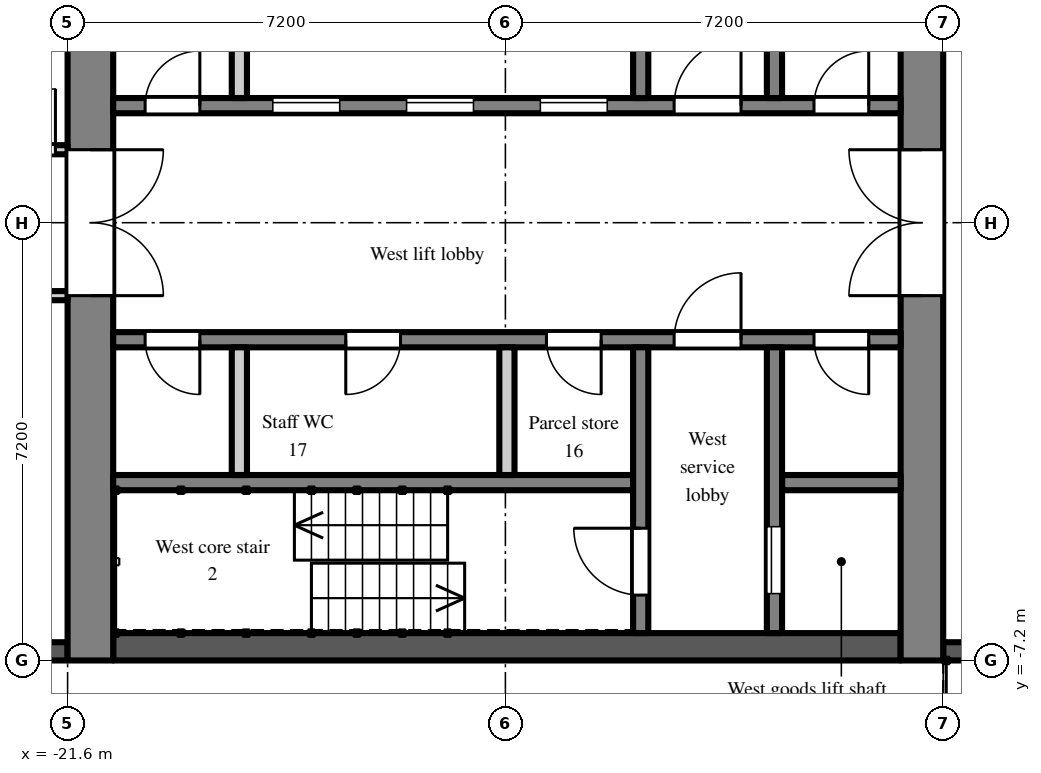
"""IFC4 building model, lengths in metres.
Left out: names, types, materials, properties, quantities, classifications, styles, units other than length and angle.
Written with IfcOpenShell. Run it as: python <this file> out.ifc"""

import sys

from ifc_helpers import new_model, si_unit, direction, frame, frame_2d, origin, place, context, subcontext, project, spatial, rectangle, extrude, element, fill, save


model = new_model("IFC4")
c1 = context("Model", 3, precision=1e-05, world=origin(), true_north=direction((0.0, 1.0)))
c2 = subcontext(c1, "Body", "Model", "MODEL_VIEW")
j1 = project(units=[si_unit("LENGTHUNIT", "METRE"), si_unit("PLANEANGLEUNIT", "RADIAN")], contexts=[c1])
p1 = place(None, origin())
s1 = spatial("IfcSite", under=j1, at=p1, CompositionType="ELEMENT")
p2 = place(p1, origin())
s2 = spatial("IfcBuilding", under=s1, at=p2, CompositionType="ELEMENT")
p3 = place(p2, frame((0.0, 0.0, 123.3)))
s3 = spatial("IfcBuildingStorey", under=s2, at=p3, CompositionType="ELEMENT", Elevation=123.3)
p4 = place(p3, frame((-24.3, -7.05, 0.0), z_axis=(0.0, 0.0, 1.0), x_axis=(1.0, 0.0, 0.0)))
e1 = element("IfcWall", 1, at=p4, inside=s3, PredefinedType="SOLIDWALL", context=c2, shape_type="SweptSolid", body=[
    extrude(rectangle(XDim=2.7, YDim=0.3, at=frame_2d((1.35, 0.0))), origin(), (0.0, 0.0, 1.0), 2.2),
])
p5 = place(p4, frame((0.75, 0.0, 0.2)))
e2 = element("IfcOpeningElement", 2, at=p5, cuts=e1, PredefinedType="OPENING", context=c2, shape_type="SweptSolid", body=[
    extrude(rectangle(XDim=1.2, YDim=1.85, at=frame_2d((0.6, 0.925))), frame((0.0, 0.16, 0.0), z_axis=(0.0, -1.0, 0.0), x_axis=(1.0, 0.0, 0.0)), (0.0, 0.0, 1.0), 0.32),
])
p6 = place(p3, frame((-7.2, -7.05, 0.0), z_axis=(0.0, 0.0, 1.0), x_axis=(1.0, 0.0, 0.0)))
e3 = element("IfcWall", 3, at=p6, inside=s3, PredefinedType="SOLIDWALL", context=c2, shape_type="SweptSolid", body=[
    extrude(rectangle(XDim=3.0, YDim=0.3, at=frame_2d((1.5, 0.0))), origin(), (0.0, 0.0, 1.0), 2.2),
])
p7 = place(p3, frame((-7.55, -7.2, 0.0), z_axis=(0.0, 0.0, 1.0), x_axis=(0.0, 1.0, 0.0)))
e4 = element("IfcWall", 4, at=p7, inside=s3, PredefinedType="SHEAR", context=c2, shape_type="SweptSolid", body=[
    extrude(rectangle(XDim=14.4, YDim=0.7, at=frame_2d((7.2, 0.0))), origin(), (0.0, 0.0, 1.0), 2.6),
])
p8 = place(p7, frame((6.0, 0.0, 0.0)))
e5 = element("IfcOpeningElement", 5, at=p8, cuts=e4, PredefinedType="OPENING", context=c2, shape_type="SweptSolid", body=[
    extrude(rectangle(XDim=2.4, YDim=2.2, at=frame_2d((1.2, 1.1))), frame((0.0, 0.36, 0.0), z_axis=(0.0, -1.0, 0.0), x_axis=(1.0, 0.0, 0.0)), (0.0, 0.0, 1.0), 0.72),
])
p9 = place(p3, frame((-21.225, -7.2, 0.0), z_axis=(0.0, 0.0, 1.0), x_axis=(0.0, 1.0, 0.0)))
e6 = element("IfcWall", 6, at=p9, inside=s3, PredefinedType="SHEAR", context=c2, shape_type="SweptSolid", body=[
    extrude(rectangle(XDim=14.4, YDim=0.75, at=frame_2d((7.2, 0.0))), origin(), (0.0, 0.0, 1.0), 2.6),
])
p10 = place(p9, frame((6.0, 0.0, 0.0)))
e7 = element("IfcOpeningElement", 7, at=p10, cuts=e6, PredefinedType="OPENING", context=c2, shape_type="SweptSolid", body=[
    extrude(rectangle(XDim=2.4, YDim=2.2, at=frame_2d((1.2, 1.1))), frame((0.0, 0.385, 0.0), z_axis=(0.0, -1.0, 0.0), x_axis=(1.0, 0.0, 0.0)), (0.0, 0.0, 1.0), 0.77),
])
p11 = place(p3, frame((-7.9, 1.925, 0.0), z_axis=(0.0, 0.0, 1.0), x_axis=(-1.0, 0.0, 0.0)))
e8 = element("IfcWall", 8, at=p11, inside=s3, PredefinedType="SHEAR", context=c2, shape_type="SweptSolid", body=[
    extrude(rectangle(XDim=12.95, YDim=0.25, at=frame_2d((6.475, 0.0))), origin(), (0.0, 0.0, 1.0), 2.6),
])
p12 = place(p11, frame((4.825, 0.0, 0.0)))
e9 = element("IfcOpeningElement", 9, at=p12, cuts=e8, PredefinedType="OPENING", context=c2, shape_type="SweptSolid", body=[
    extrude(rectangle(XDim=1.1, YDim=2.1, at=frame_2d((0.55, 1.05))), frame((0.0, 0.135, 0.0), z_axis=(0.0, -1.0, 0.0), x_axis=(1.0, 0.0, 0.0)), (0.0, 0.0, 1.0), 0.27),
])
p13 = place(p11, frame((7.025, 0.0, 0.0)))
e10 = element("IfcOpeningElement", 10, at=p13, cuts=e8, PredefinedType="OPENING", context=c2, shape_type="SweptSolid", body=[
    extrude(rectangle(XDim=1.1, YDim=2.1, at=frame_2d((0.55, 1.05))), frame((0.0, 0.135, 0.0), z_axis=(0.0, -1.0, 0.0), x_axis=(1.0, 0.0, 0.0)), (0.0, 0.0, 1.0), 0.27),
])
p14 = place(p11, frame((9.225, 0.0, 0.0)))
e11 = element("IfcOpeningElement", 11, at=p14, cuts=e8, PredefinedType="OPENING", context=c2, shape_type="SweptSolid", body=[
    extrude(rectangle(XDim=1.1, YDim=2.1, at=frame_2d((0.55, 1.05))), frame((0.0, 0.135, 0.0), z_axis=(0.0, -1.0, 0.0), x_axis=(1.0, 0.0, 0.0)), (0.0, 0.0, 1.0), 0.27),
])
p15 = place(p11, frame((0.525, 0.0, 0.0)))
e12 = element("IfcOpeningElement", 12, at=p15, cuts=e8, PredefinedType="OPENING", context=c2, shape_type="SweptSolid", body=[
    extrude(rectangle(XDim=0.9, YDim=2.1, at=frame_2d((0.45, 1.05))), frame((0.0, 0.135, 0.0), z_axis=(0.0, -1.0, 0.0), x_axis=(1.0, 0.0, 0.0)), (0.0, 0.0, 1.0), 0.27),
])
p16 = place(p11, frame((2.625, 0.0, 0.0)))
e13 = element("IfcOpeningElement", 13, at=p16, cuts=e8, PredefinedType="OPENING", context=c2, shape_type="SweptSolid", body=[
    extrude(rectangle(XDim=1.1, YDim=2.1, at=frame_2d((0.55, 1.05))), frame((0.0, 0.135, 0.0), z_axis=(0.0, -1.0, 0.0), x_axis=(1.0, 0.0, 0.0)), (0.0, 0.0, 1.0), 0.27),
])
p17 = place(p11, frame((11.525, 0.0, 0.0)))
e14 = element("IfcOpeningElement", 14, at=p17, cuts=e8, PredefinedType="OPENING", context=c2, shape_type="SweptSolid", body=[
    extrude(rectangle(XDim=0.9, YDim=2.1, at=frame_2d((0.45, 1.05))), frame((0.0, 0.135, 0.0), z_axis=(0.0, -1.0, 0.0), x_axis=(1.0, 0.0, 0.0)), (0.0, 0.0, 1.0), 0.27),
])
p18 = place(p3, frame((-9.975, 2.05, 0.0), z_axis=(0.0, 0.0, 1.0), x_axis=(0.0, 1.0, 0.0)))
e15 = element("IfcWall", 15, at=p18, inside=s3, PredefinedType="SHEAR", context=c2, shape_type="SweptSolid", body=[
    extrude(rectangle(XDim=4.7, YDim=0.25, at=frame_2d((2.35, 0.0))), origin(), (0.0, 0.0, 1.0), 2.6),
])
p19 = place(p18, frame((2.95, 0.0, 0.0)))
e16 = element("IfcOpeningElement", 16, at=p19, cuts=e15, PredefinedType="OPENING", context=c2, shape_type="SweptSolid", body=[
    extrude(rectangle(XDim=1.1, YDim=2.1, at=frame_2d((0.55, 1.05))), frame((0.0, 0.135, 0.0), z_axis=(0.0, -1.0, 0.0), x_axis=(1.0, 0.0, 0.0)), (0.0, 0.0, 1.0), 0.27),
])
p20 = place(p3, frame((-12.175, 2.05, 0.0), z_axis=(0.0, 0.0, 1.0), x_axis=(0.0, 1.0, 0.0)))
e17 = element("IfcWall", 17, at=p20, inside=s3, PredefinedType="SHEAR", context=c2, shape_type="SweptSolid", body=[
    extrude(rectangle(XDim=4.7, YDim=0.25, at=frame_2d((2.35, 0.0))), origin(), (0.0, 0.0, 1.0), 2.6),
])
p21 = place(p20, frame((2.975, 0.0, 0.0)))
e18 = element("IfcOpeningElement", 18, at=p21, cuts=e17, PredefinedType="OPENING", context=c2, shape_type="SweptSolid", body=[
    extrude(rectangle(XDim=1.1, YDim=2.1, at=frame_2d((0.55, 1.05))), frame((0.0, 0.135, 0.0), z_axis=(0.0, -1.0, 0.0), x_axis=(1.0, 0.0, 0.0)), (0.0, 0.0, 1.0), 0.27),
])
p22 = place(p3, frame((-18.775, 2.05, 0.0), z_axis=(0.0, 0.0, 1.0), x_axis=(0.0, 1.0, 0.0)))
e19 = element("IfcWall", 19, at=p22, inside=s3, PredefinedType="PARTITIONING", context=c2, shape_type="SweptSolid", body=[
    extrude(rectangle(XDim=2.1, YDim=0.25, at=frame_2d((1.05, 0.0))), origin(), (0.0, 0.0, 1.0), 2.6),
])
p23 = place(p3, frame((-7.9, -6.975, 0.0), z_axis=(0.0, 0.0, 1.0), x_axis=(-1.0, 0.0, 0.0)))
e20 = element("IfcWall", 20, at=p23, inside=s3, PredefinedType="SHEAR", context=c2, shape_type="SweptSolid", body=[
    extrude(rectangle(XDim=12.95, YDim=0.45, at=frame_2d((6.475, 0.0))), origin(), (0.0, 0.0, 1.0), 2.6),
])
p24 = place(p3, frame((-7.9, -1.925, 0.0), z_axis=(0.0, 0.0, 1.0), x_axis=(-1.0, 0.0, 0.0)))
e21 = element("IfcWall", 21, at=p24, inside=s3, PredefinedType="SHEAR", context=c2, shape_type="SweptSolid", body=[
    extrude(rectangle(XDim=12.95, YDim=0.25, at=frame_2d((6.475, 0.0))), origin(), (0.0, 0.0, 1.0), 2.6),
])
p25 = place(p24, frame((0.525, 0.0, 0.0)))
e22 = element("IfcOpeningElement", 22, at=p25, cuts=e21, PredefinedType="OPENING", context=c2, shape_type="SweptSolid", body=[
    extrude(rectangle(XDim=0.9, YDim=2.1, at=frame_2d((0.45, 1.05))), frame((0.0, 0.135, 0.0), z_axis=(0.0, -1.0, 0.0), x_axis=(1.0, 0.0, 0.0)), (0.0, 0.0, 1.0), 0.27),
])
p26 = place(p24, frame((2.625, 0.0, 0.0)))
e23 = element("IfcOpeningElement", 23, at=p26, cuts=e21, PredefinedType="OPENING", context=c2, shape_type="SweptSolid", body=[
    extrude(rectangle(XDim=1.1, YDim=2.1, at=frame_2d((0.55, 1.05))), frame((0.0, 0.135, 0.0), z_axis=(0.0, -1.0, 0.0), x_axis=(1.0, 0.0, 0.0)), (0.0, 0.0, 1.0), 0.27),
])
p27 = place(p24, frame((4.925, 0.0, 0.0)))
e24 = element("IfcOpeningElement", 24, at=p27, cuts=e21, PredefinedType="OPENING", context=c2, shape_type="SweptSolid", body=[
    extrude(rectangle(XDim=0.9, YDim=2.1, at=frame_2d((0.45, 1.05))), frame((0.0, 0.135, 0.0), z_axis=(0.0, -1.0, 0.0), x_axis=(1.0, 0.0, 0.0)), (0.0, 0.0, 1.0), 0.27),
])
p28 = place(p24, frame((8.225, 0.0, 0.0)))
e25 = element("IfcOpeningElement", 25, at=p28, cuts=e21, PredefinedType="OPENING", context=c2, shape_type="SweptSolid", body=[
    extrude(rectangle(XDim=0.9, YDim=2.1, at=frame_2d((0.45, 1.05))), frame((0.0, 0.135, 0.0), z_axis=(0.0, -1.0, 0.0), x_axis=(1.0, 0.0, 0.0)), (0.0, 0.0, 1.0), 0.27),
])
p29 = place(p24, frame((11.525, 0.0, 0.0)))
e26 = element("IfcOpeningElement", 26, at=p29, cuts=e21, PredefinedType="OPENING", context=c2, shape_type="SweptSolid", body=[
    extrude(rectangle(XDim=0.9, YDim=2.1, at=frame_2d((0.45, 1.05))), frame((0.0, 0.135, 0.0), z_axis=(0.0, -1.0, 0.0), x_axis=(1.0, 0.0, 0.0)), (0.0, 0.0, 1.0), 0.27),
])
p30 = place(p3, frame((-7.9, -4.275, 0.0), z_axis=(0.0, 0.0, 1.0), x_axis=(-1.0, 0.0, 0.0)))
e27 = element("IfcWall", 27, at=p30, inside=s3, PredefinedType="SHEAR", context=c2, shape_type="SweptSolid", body=[
    extrude(rectangle(XDim=1.95, YDim=0.25, at=frame_2d((0.975, 0.0))), origin(), (0.0, 0.0, 1.0), 2.6),
])
p31 = place(p3, frame((-12.3, -4.275, 0.0), z_axis=(0.0, 0.0, 1.0), x_axis=(-1.0, 0.0, 0.0)))
e28 = element("IfcWall", 28, at=p31, inside=s3, PredefinedType="SHEAR", context=c2, shape_type="SweptSolid", body=[
    extrude(rectangle(XDim=8.55, YDim=0.25, at=frame_2d((4.275, 0.0))), origin(), (0.0, 0.0, 1.0), 2.6),
])
p32 = place(p3, frame((-9.975, -2.05, 0.0), z_axis=(0.0, 0.0, 1.0), x_axis=(0.0, -1.0, 0.0)))
e29 = element("IfcWall", 29, at=p32, inside=s3, PredefinedType="SHEAR", context=c2, shape_type="SweptSolid", body=[
    extrude(rectangle(XDim=4.7, YDim=0.25, at=frame_2d((2.35, 0.0))), origin(), (0.0, 0.0, 1.0), 2.6),
])
p33 = place(p32, frame((2.95, 0.0, 0.0)))
e30 = element("IfcOpeningElement", 30, at=p33, cuts=e29, PredefinedType="OPENING", context=c2, shape_type="SweptSolid", body=[
    extrude(rectangle(XDim=1.1, YDim=2.1, at=frame_2d((0.55, 1.05))), frame((0.0, 0.135, 0.0), z_axis=(0.0, -1.0, 0.0), x_axis=(1.0, 0.0, 0.0)), (0.0, 0.0, 1.0), 0.27),
])
p34 = place(p3, frame((-12.175, -2.05, 0.0), z_axis=(0.0, 0.0, 1.0), x_axis=(0.0, -1.0, 0.0)))
e31 = element("IfcWall", 31, at=p34, inside=s3, PredefinedType="SHEAR", context=c2, shape_type="SweptSolid", body=[
    extrude(rectangle(XDim=4.7, YDim=0.25, at=frame_2d((2.35, 0.0))), origin(), (0.0, 0.0, 1.0), 2.6),
])
p35 = place(p34, frame((2.975, 0.0, 0.0)))
e32 = element("IfcOpeningElement", 32, at=p35, cuts=e31, PredefinedType="OPENING", context=c2, shape_type="SweptSolid", body=[
    extrude(rectangle(XDim=1.1, YDim=2.1, at=frame_2d((0.55, 1.05))), frame((0.0, 0.135, 0.0), z_axis=(0.0, -1.0, 0.0), x_axis=(1.0, 0.0, 0.0)), (0.0, 0.0, 1.0), 0.27),
])
for number, where, z_axis, x_axis in (
    (33, (-14.375, -2.05, 0.0), (0.0, 0.0, 1.0), (0.0, -1.0, 0.0)),
    (34, (-18.775, -2.05, 0.0), (0.0, 0.0, 1.0), (0.0, -1.0, 0.0)),
):
    element("IfcWall", number, at=place(p3, frame(where, z_axis=z_axis, x_axis=x_axis)), inside=s3, PredefinedType="PARTITIONING", context=c2, shape_type="SweptSolid", body=[
        extrude(rectangle(XDim=2.1, YDim=0.25, at=frame_2d((1.05, 0.0))), origin(), (0.0, 0.0, 1.0), 2.6),
    ])
p36 = place(p3, frame((-36.5, -1.2, 0.0), z_axis=(0.0, 0.0, 1.0), x_axis=(1.0, 0.0, 0.0)))
e35 = element("IfcWall", 35, at=p36, inside=s3, PredefinedType="PARTITIONING", context=c2, shape_type="SweptSolid", body=[
    extrude(rectangle(XDim=14.9, YDim=0.15, at=frame_2d((7.45, 0.0))), origin(), (0.0, 0.0, 1.0), 2.6),
])
p37 = place(p36, frame((13.3, 0.0, 0.0)))
e36 = element("IfcOpeningElement", 36, at=p37, cuts=e35, PredefinedType="OPENING", context=c2, shape_type="SweptSolid", body=[
    extrude(rectangle(XDim=1.0, YDim=2.1, at=frame_2d((0.5, 1.05))), frame((0.0, 0.085, 0.0), z_axis=(0.0, -1.0, 0.0), x_axis=(1.0, 0.0, 0.0)), (0.0, 0.0, 1.0), 0.17),
])
p38 = place(p36, frame((4.41, 0.0, 0.0)))
e37 = element("IfcOpeningElement", 37, at=p38, cuts=e35, PredefinedType="OPENING", context=c2, shape_type="SweptSolid", body=[
    extrude(rectangle(XDim=1.0, YDim=2.1, at=frame_2d((0.5, 1.05))), frame((0.0, 0.085, 0.0), z_axis=(0.0, -1.0, 0.0), x_axis=(1.0, 0.0, 0.0)), (0.0, 0.0, 1.0), 0.17),
])
p39 = place(p36, frame((1.15, 0.0, 0.0)))
e38 = element("IfcOpeningElement", 38, at=p39, cuts=e35, PredefinedType="OPENING", context=c2, shape_type="SweptSolid", body=[
    extrude(rectangle(XDim=1.8, YDim=2.1, at=frame_2d((0.9, 1.05))), frame((0.0, 0.085, 0.0), z_axis=(0.0, -1.0, 0.0), x_axis=(1.0, 0.0, 0.0)), (0.0, 0.0, 1.0), 0.17),
])
p40 = place(p3, frame((-36.5, 1.2, 0.0), z_axis=(0.0, 0.0, 1.0), x_axis=(1.0, 0.0, 0.0)))
e39 = element("IfcWall", 39, at=p40, inside=s3, PredefinedType="PARTITIONING", context=c2, shape_type="SweptSolid", body=[
    extrude(rectangle(XDim=14.9, YDim=0.15, at=frame_2d((7.45, 0.0))), origin(), (0.0, 0.0, 1.0), 2.6),
])
p41 = place(p40, frame((13.7, 0.0, 0.0)))
e40 = element("IfcOpeningElement", 40, at=p41, cuts=e39, PredefinedType="OPENING", context=c2, shape_type="SweptSolid", body=[
    extrude(rectangle(XDim=1.0, YDim=2.1, at=frame_2d((0.5, 1.05))), frame((0.0, 0.085, 0.0), z_axis=(0.0, -1.0, 0.0), x_axis=(1.0, 0.0, 0.0)), (0.0, 0.0, 1.0), 0.17),
])
p42 = place(p40, frame((8.19, 0.0, 0.0)))
e41 = element("IfcOpeningElement", 41, at=p42, cuts=e39, PredefinedType="OPENING", context=c2, shape_type="SweptSolid", body=[
    extrude(rectangle(XDim=1.0, YDim=2.1, at=frame_2d((0.5, 1.05))), frame((0.0, 0.085, 0.0), z_axis=(0.0, -1.0, 0.0), x_axis=(1.0, 0.0, 0.0)), (0.0, 0.0, 1.0), 0.17),
])
p43 = place(p40, frame((1.15, 0.0, 0.0)))
e42 = element("IfcOpeningElement", 42, at=p43, cuts=e39, PredefinedType="OPENING", context=c2, shape_type="SweptSolid", body=[
    extrude(rectangle(XDim=1.8, YDim=2.1, at=frame_2d((0.9, 1.05))), frame((0.0, 0.085, 0.0), z_axis=(0.0, -1.0, 0.0), x_axis=(1.0, 0.0, 0.0)), (0.0, 0.0, 1.0), 0.17),
])
p44 = place(p12, origin())
e43 = element("IfcDoor", 43, at=p44, inside=s3, OperationType="SLIDING_TO_LEFT", PredefinedType="DOOR", context=c2, shape_type="SweptSolid", body=[
    extrude(rectangle(XDim=1.1, YDim=2.1, at=frame_2d((0.55, 1.05))), frame((0.0, 0.025, 0.0), z_axis=(0.0, -1.0, 0.0), x_axis=(1.0, 0.0, 0.0)), (0.0, 0.0, 1.0), 0.05),
])
fill(e9, e43)
p45 = place(p13, origin())
e44 = element("IfcDoor", 44, at=p45, inside=s3, OperationType="SLIDING_TO_LEFT", PredefinedType="DOOR", context=c2, shape_type="SweptSolid", body=[
    extrude(rectangle(XDim=1.1, YDim=2.1, at=frame_2d((0.55, 1.05))), frame((0.0, 0.025, 0.0), z_axis=(0.0, -1.0, 0.0), x_axis=(1.0, 0.0, 0.0)), (0.0, 0.0, 1.0), 0.05),
])
fill(e10, e44)
p46 = place(p14, origin())
e45 = element("IfcDoor", 45, at=p46, inside=s3, OperationType="SLIDING_TO_LEFT", PredefinedType="DOOR", context=c2, shape_type="SweptSolid", body=[
    extrude(rectangle(XDim=1.1, YDim=2.1, at=frame_2d((0.55, 1.05))), frame((0.0, 0.025, 0.0), z_axis=(0.0, -1.0, 0.0), x_axis=(1.0, 0.0, 0.0)), (0.0, 0.0, 1.0), 0.05),
])
fill(e11, e45)
p47 = place(p33, origin())
e46 = element("IfcDoor", 46, at=p47, inside=s3, OperationType="SLIDING_TO_LEFT", PredefinedType="DOOR", context=c2, shape_type="SweptSolid", body=[
    extrude(rectangle(XDim=1.1, YDim=2.1, at=frame_2d((0.55, 1.05))), frame((0.0, 0.025, 0.0), z_axis=(0.0, -1.0, 0.0), x_axis=(1.0, 0.0, 0.0)), (0.0, 0.0, 1.0), 0.05),
])
fill(e30, e46)
p48 = place(p35, frame((1.1, 0.0, 0.0), z_axis=(0.0, 0.0, 1.0), x_axis=(-1.0, 0.0, 0.0)))
e47 = element("IfcDoor", 47, at=p48, inside=s3, OperationType="SINGLE_SWING_RIGHT", PredefinedType="DOOR", context=c2, shape_type="SweptSolid", body=[
    extrude(rectangle(XDim=1.1, YDim=2.1, at=frame_2d((0.55, 1.05))), frame((0.0, 0.025, 0.0), z_axis=(0.0, -1.0, 0.0), x_axis=(1.0, 0.0, 0.0)), (0.0, 0.0, 1.0), 0.05),
])
fill(e32, e47)
p49 = place(p15, frame((0.9, 0.0, 0.0), z_axis=(0.0, 0.0, 1.0), x_axis=(-1.0, 0.0, 0.0)))
e48 = element("IfcDoor", 48, at=p49, inside=s3, OperationType="SINGLE_SWING_RIGHT", PredefinedType="DOOR", context=c2, shape_type="SweptSolid", body=[
    extrude(rectangle(XDim=0.9, YDim=2.1, at=frame_2d((0.45, 1.05))), frame((0.0, 0.025, 0.0), z_axis=(0.0, -1.0, 0.0), x_axis=(1.0, 0.0, 0.0)), (0.0, 0.0, 1.0), 0.05),
])
fill(e12, e48)
p50 = place(p25, origin())
e49 = element("IfcDoor", 49, at=p50, inside=s3, OperationType="SINGLE_SWING_LEFT", PredefinedType="DOOR", context=c2, shape_type="SweptSolid", body=[
    extrude(rectangle(XDim=0.9, YDim=2.1, at=frame_2d((0.45, 1.05))), frame((0.0, 0.025, 0.0), z_axis=(0.0, -1.0, 0.0), x_axis=(1.0, 0.0, 0.0)), (0.0, 0.0, 1.0), 0.05),
])
fill(e22, e49)
p51 = place(p16, frame((1.1, 0.0, 0.0), z_axis=(0.0, 0.0, 1.0), x_axis=(-1.0, 0.0, 0.0)))
e50 = element("IfcDoor", 50, at=p51, inside=s3, OperationType="SINGLE_SWING_RIGHT", PredefinedType="DOOR", context=c2, shape_type="SweptSolid", body=[
    extrude(rectangle(XDim=1.1, YDim=2.1, at=frame_2d((0.55, 1.05))), frame((0.0, 0.025, 0.0), z_axis=(0.0, -1.0, 0.0), x_axis=(1.0, 0.0, 0.0)), (0.0, 0.0, 1.0), 0.05),
])
fill(e13, e50)
p52 = place(p26, frame((1.1, 0.0, 0.0), z_axis=(0.0, 0.0, 1.0), x_axis=(-1.0, 0.0, 0.0)))
e51 = element("IfcDoor", 51, at=p52, inside=s3, OperationType="SINGLE_SWING_RIGHT", PredefinedType="DOOR", context=c2, shape_type="SweptSolid", body=[
    extrude(rectangle(XDim=1.1, YDim=2.1, at=frame_2d((0.55, 1.05))), frame((0.0, 0.025, 0.0), z_axis=(0.0, -1.0, 0.0), x_axis=(1.0, 0.0, 0.0)), (0.0, 0.0, 1.0), 0.05),
])
fill(e23, e51)
p53 = place(p8, origin())
e52 = element("IfcDoor", 52, at=p53, inside=s3, OperationType="DOUBLE_DOOR_DOUBLE_SWING", PredefinedType="DOOR", context=c2, shape_type="SweptSolid", body=[
    extrude(rectangle(XDim=2.4, YDim=2.2, at=frame_2d((1.2, 1.1))), frame((0.0, 0.025, 0.0), z_axis=(0.0, -1.0, 0.0), x_axis=(1.0, 0.0, 0.0)), (0.0, 0.0, 1.0), 0.05),
])
fill(e5, e52)
p54 = place(p10, frame((2.4, 0.0, 0.0), z_axis=(0.0, 0.0, 1.0), x_axis=(-1.0, 0.0, 0.0)))
e53 = element("IfcDoor", 53, at=p54, inside=s3, OperationType="DOUBLE_DOOR_DOUBLE_SWING", PredefinedType="DOOR", context=c2, shape_type="SweptSolid", body=[
    extrude(rectangle(XDim=2.4, YDim=2.2, at=frame_2d((1.2, 1.1))), frame((0.0, 0.025, 0.0), z_axis=(0.0, -1.0, 0.0), x_axis=(1.0, 0.0, 0.0)), (0.0, 0.0, 1.0), 0.05),
])
fill(e7, e53)
p55 = place(p17, frame((0.9, 0.0, 0.0), z_axis=(0.0, 0.0, 1.0), x_axis=(-1.0, 0.0, 0.0)))
e54 = element("IfcDoor", 54, at=p55, inside=s3, OperationType="SINGLE_SWING_RIGHT", PredefinedType="DOOR", context=c2, shape_type="SweptSolid", body=[
    extrude(rectangle(XDim=0.9, YDim=2.1, at=frame_2d((0.45, 1.05))), frame((0.0, 0.025, 0.0), z_axis=(0.0, -1.0, 0.0), x_axis=(1.0, 0.0, 0.0)), (0.0, 0.0, 1.0), 0.05),
])
fill(e14, e54)
p56 = place(p27, origin())
e55 = element("IfcDoor", 55, at=p56, inside=s3, OperationType="SINGLE_SWING_LEFT", PredefinedType="DOOR", context=c2, shape_type="SweptSolid", body=[
    extrude(rectangle(XDim=0.9, YDim=2.1, at=frame_2d((0.45, 1.05))), frame((0.0, 0.025, 0.0), z_axis=(0.0, -1.0, 0.0), x_axis=(1.0, 0.0, 0.0)), (0.0, 0.0, 1.0), 0.05),
])
fill(e24, e55)
p57 = place(p28, origin())
e56 = element("IfcDoor", 56, at=p57, inside=s3, OperationType="SINGLE_SWING_RIGHT", PredefinedType="DOOR", context=c2, shape_type="SweptSolid", body=[
    extrude(rectangle(XDim=0.9, YDim=2.1, at=frame_2d((0.45, 1.05))), frame((0.0, 0.025, 0.0), z_axis=(0.0, -1.0, 0.0), x_axis=(1.0, 0.0, 0.0)), (0.0, 0.0, 1.0), 0.05),
])
fill(e25, e56)
p58 = place(p29, origin())
e57 = element("IfcDoor", 57, at=p58, inside=s3, OperationType="SINGLE_SWING_LEFT", PredefinedType="DOOR", context=c2, shape_type="SweptSolid", body=[
    extrude(rectangle(XDim=0.9, YDim=2.1, at=frame_2d((0.45, 1.05))), frame((0.0, 0.025, 0.0), z_axis=(0.0, -1.0, 0.0), x_axis=(1.0, 0.0, 0.0)), (0.0, 0.0, 1.0), 0.05),
])
fill(e26, e57)
p59 = place(p41, origin())
e58 = element("IfcDoor", 58, at=p59, inside=s3, OperationType="SINGLE_SWING_RIGHT", PredefinedType="DOOR", context=c2, shape_type="SweptSolid", body=[
    extrude(rectangle(XDim=1.0, YDim=2.1, at=frame_2d((0.5, 1.05))), frame((0.0, 0.025, 0.0), z_axis=(0.0, -1.0, 0.0), x_axis=(1.0, 0.0, 0.0)), (0.0, 0.0, 1.0), 0.05),
])
fill(e40, e58)
save(model, sys.argv[1])
